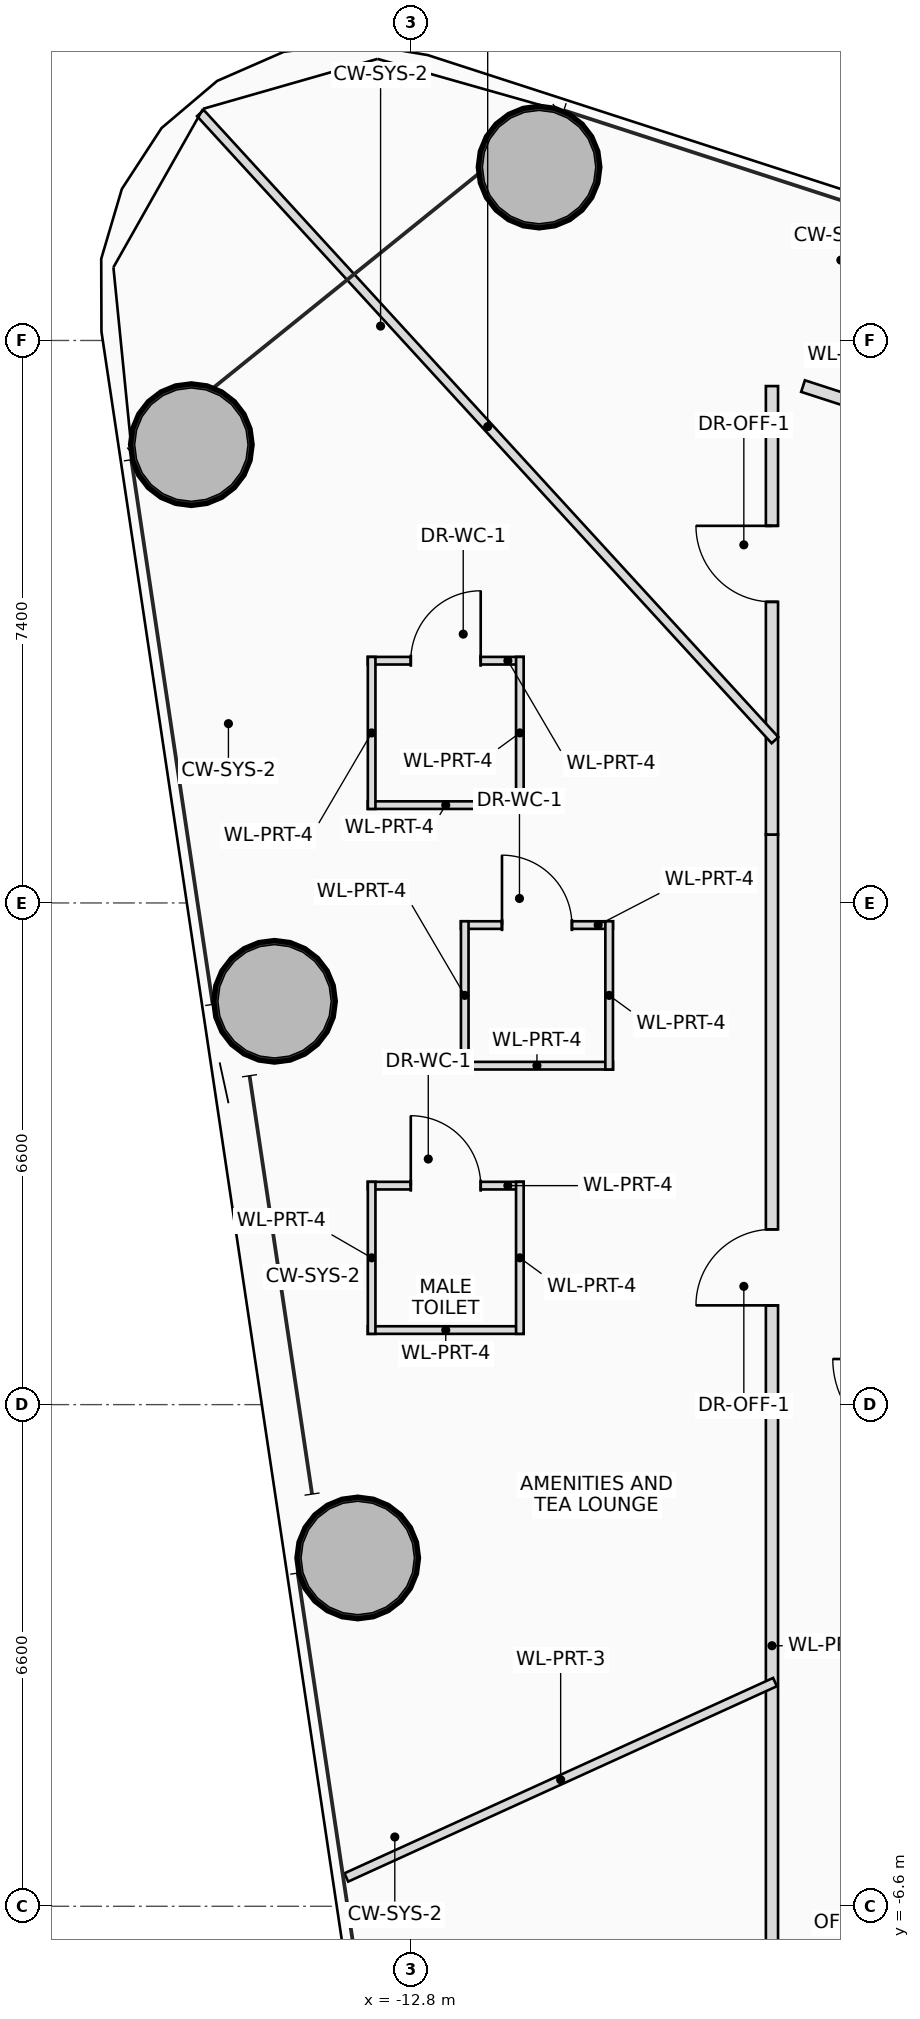
"""IFC4 building model, lengths in metres.
Left out: names, types, materials, properties, quantities, classifications, styles, units other than length and angle.
Written with IfcOpenShell. Run it as: python <this file> out.ifc"""

import sys

from ifc_helpers import new_model, si_unit, direction, frame, frame_2d, origin, origin_2d, place, context, subcontext, project, spatial, rectangle, hollow_circle, extrude, source, transform, mapped, element, fill, save


model = new_model("IFC4")
c1 = context("Model", 3, precision=1e-05, world=origin(), true_north=direction((0.0, 1.0)))
c2 = subcontext(c1, "Body", "Model", "MODEL_VIEW")
j1 = project(units=[si_unit("LENGTHUNIT", "METRE"), si_unit("PLANEANGLEUNIT", "RADIAN")], contexts=[c1])
p1 = place(None, origin())
s1 = spatial("IfcSite", under=j1, at=p1, CompositionType="ELEMENT")
p2 = place(p1, origin())
s2 = spatial("IfcBuilding", under=s1, at=p2, CompositionType="ELEMENT")
p3 = place(p2, frame((0.0, 0.0, 58.55)))
s3 = spatial("IfcBuildingStorey", under=s2, at=p3, CompositionType="ELEMENT", Elevation=58.55)
m1 = source(origin(), c2, "Body", "SweptSolid", [
    extrude(hollow_circle(Radius=0.8, WallThickness=0.055, at=origin_2d()), origin(), (0.0, 0.0, 1.0), 3.75),
])
for number, where, z_axis, x_axis in (
    (1, (-11.114, 16.281, 0.0), (0.0, 0.0, 1.0), (1.0, 0.0, 0.0)),
    (2, (-15.689, 12.629, 0.0), (0.0, 0.0, 1.0), (1.0, 0.0, 0.0)),
    (3, (-14.594, 5.306, 0.0), (0.0, 0.0, 1.0), (1.0, 0.0, 0.0)),
    (4, (-13.5, -2.018, 0.0), (0.0, 0.0, 1.0), (1.0, 0.0, 0.0)),
):
    element("IfcColumn", number, at=place(p3, frame(where, z_axis=z_axis, x_axis=x_axis)), inside=s3, PredefinedType="COLUMN", context=c2, shape_type="MappedRepresentation", body=[
        mapped(m1, transform((0.0, 0.0, 0.0), scale=1.0)),
    ])
p4 = place(p3, frame((-13.367, 2.881, 0.0), z_axis=(0.0, 0.0, 1.0), x_axis=(1.0, 0.0, 0.0)))
e5 = element("IfcWall", 5, at=p4, inside=s3, PredefinedType="PARTITIONING", context=c2, shape_type="SweptSolid", body=[
    extrude(rectangle(XDim=2.05, YDim=0.1, at=frame_2d((1.025, 0.0))), origin(), (0.0, 0.0, 1.0), 3.2),
])
p5 = place(p4, frame((0.565, 0.0, 0.0)))
e6 = element("IfcOpeningElement", 6, at=p5, cuts=e5, PredefinedType="OPENING", context=c2, shape_type="SweptSolid", body=[
    extrude(rectangle(XDim=0.92, YDim=2.1, at=frame_2d((0.46, 1.05))), frame((0.0, 0.06, 0.0), z_axis=(0.0, -1.0, 0.0), x_axis=(1.0, 0.0, 0.0)), (0.0, 0.0, 1.0), 0.12),
])
p6 = place(p3, frame((-11.317, 0.981, 0.0), z_axis=(0.0, 0.0, 1.0), x_axis=(-1.0, 0.0, 0.0)))
e7 = element("IfcWall", 7, at=p6, inside=s3, PredefinedType="PARTITIONING", context=c2, shape_type="SweptSolid", body=[
    extrude(rectangle(XDim=2.05, YDim=0.1, at=frame_2d((1.025, 0.0))), origin(), (0.0, 0.0, 1.0), 3.545),
])
p7 = place(p3, frame((-11.367, 2.931, 0.0), z_axis=(0.0, 0.0, 1.0), x_axis=(0.0, -1.0, 0.0)))
e8 = element("IfcWall", 8, at=p7, inside=s3, PredefinedType="PARTITIONING", context=c2, shape_type="SweptSolid", body=[
    extrude(rectangle(XDim=2.0, YDim=0.1, at=frame_2d((1.0, 0.0))), origin(), (0.0, 0.0, 1.0), 3.2),
])
p8 = place(p3, frame((-13.317, 0.931, 0.0), z_axis=(0.0, 0.0, 1.0), x_axis=(0.0, 1.0, 0.0)))
e9 = element("IfcWall", 9, at=p8, inside=s3, PredefinedType="PARTITIONING", context=c2, shape_type="SweptSolid", body=[
    extrude(rectangle(XDim=2.0, YDim=0.1, at=frame_2d((1.0, 0.0))), origin(), (0.0, 0.0, 1.0), 3.545),
])
p9 = place(p3, frame((-13.367, 9.787, 0.0), z_axis=(0.0, 0.0, 1.0), x_axis=(1.0, 0.0, 0.0)))
e10 = element("IfcWall", 10, at=p9, inside=s3, PredefinedType="PARTITIONING", context=c2, shape_type="SweptSolid", body=[
    extrude(rectangle(XDim=2.05, YDim=0.1, at=frame_2d((1.025, 0.0))), origin(), (0.0, 0.0, 1.0), 2.85),
])
p10 = place(p9, frame((0.565, 0.0, 0.0)))
e11 = element("IfcOpeningElement", 11, at=p10, cuts=e10, PredefinedType="OPENING", context=c2, shape_type="SweptSolid", body=[
    extrude(rectangle(XDim=0.92, YDim=2.1, at=frame_2d((0.46, 1.05))), frame((0.0, 0.06, 0.0), z_axis=(0.0, -1.0, 0.0), x_axis=(1.0, 0.0, 0.0)), (0.0, 0.0, 1.0), 0.12),
])
p11 = place(p3, frame((-11.317, 7.887, 0.0), z_axis=(0.0, 0.0, 1.0), x_axis=(-1.0, 0.0, 0.0)))
e12 = element("IfcWall", 12, at=p11, inside=s3, PredefinedType="PARTITIONING", context=c2, shape_type="SweptSolid", body=[
    extrude(rectangle(XDim=2.05, YDim=0.1, at=frame_2d((1.025, 0.0))), origin(), (0.0, 0.0, 1.0), 3.2),
])
p12 = place(p3, frame((-11.367, 9.837, 0.0), z_axis=(0.0, 0.0, 1.0), x_axis=(0.0, -1.0, 0.0)))
e13 = element("IfcWall", 13, at=p12, inside=s3, PredefinedType="PARTITIONING", context=c2, shape_type="SweptSolid", body=[
    extrude(rectangle(XDim=2.0, YDim=0.1, at=frame_2d((1.0, 0.0))), origin(), (0.0, 0.0, 1.0), 2.85),
])
p13 = place(p3, frame((-13.317, 7.837, 0.0), z_axis=(0.0, 0.0, 1.0), x_axis=(0.0, 1.0, 0.0)))
e14 = element("IfcWall", 14, at=p13, inside=s3, PredefinedType="PARTITIONING", context=c2, shape_type="SweptSolid", body=[
    extrude(rectangle(XDim=2.0, YDim=0.1, at=frame_2d((1.0, 0.0))), origin(), (0.0, 0.0, 1.0), 3.545),
])
p14 = place(p3, frame((-12.142, 6.309, 0.0), z_axis=(0.0, 0.0, 1.0), x_axis=(1.0, 0.0, 0.0)))
e15 = element("IfcWall", 15, at=p14, inside=s3, PredefinedType="PARTITIONING", context=c2, shape_type="SweptSolid", body=[
    extrude(rectangle(XDim=2.0, YDim=0.1, at=frame_2d((1.0, 0.0))), origin(), (0.0, 0.0, 1.0), 3.05),
])
p15 = place(p14, frame((0.54, 0.0, 0.0)))
e16 = element("IfcOpeningElement", 16, at=p15, cuts=e15, PredefinedType="OPENING", context=c2, shape_type="SweptSolid", body=[
    extrude(rectangle(XDim=0.92, YDim=2.1, at=frame_2d((0.46, 1.05))), frame((0.0, 0.06, 0.0), z_axis=(0.0, -1.0, 0.0), x_axis=(1.0, 0.0, 0.0)), (0.0, 0.0, 1.0), 0.12),
])
p16 = place(p3, frame((-10.142, 4.459, 0.0), z_axis=(0.0, 0.0, 1.0), x_axis=(-1.0, 0.0, 0.0)))
e17 = element("IfcWall", 17, at=p16, inside=s3, PredefinedType="PARTITIONING", context=c2, shape_type="SweptSolid", body=[
    extrude(rectangle(XDim=2.0, YDim=0.1, at=frame_2d((1.0, 0.0))), origin(), (0.0, 0.0, 1.0), 3.2),
])
for number, where, z_axis, x_axis in (
    (18, (-10.192, 6.359, 0.0), (0.0, 0.0, 1.0), (0.0, -1.0, 0.0)),
    (19, (-12.092, 4.409, 0.0), (0.0, 0.0, 1.0), (0.0, 1.0, 0.0)),
):
    element("IfcWall", number, at=place(p3, frame(where, z_axis=z_axis, x_axis=x_axis)), inside=s3, PredefinedType="PARTITIONING", context=c2, shape_type="SweptSolid", body=[
        extrude(rectangle(XDim=1.95, YDim=0.1, at=frame_2d((0.975, 0.0))), origin(), (0.0, 0.0, 1.0), 2.85),
    ])
p17 = place(p3, frame((-8.05, -7.5, 0.0), z_axis=(0.0, 0.0, 1.0), x_axis=(0.0, 1.0, 0.0)))
e20 = element("IfcWall", 20, at=p17, inside=s3, PredefinedType="PARTITIONING", context=c2, shape_type="SweptSolid", body=[
    extrude(rectangle(XDim=15.0, YDim=0.16, at=frame_2d((7.5, 0.0))), origin(), (0.0, 0.0, 1.0), 2.85),
])
p18 = place(p17, frame((8.806, 0.0, 0.0)))
e21 = element("IfcOpeningElement", 21, at=p18, cuts=e20, PredefinedType="OPENING", context=c2, shape_type="SweptSolid", body=[
    extrude(rectangle(XDim=1.0, YDim=2.25, at=frame_2d((0.5, 1.125))), frame((0.0, 0.09, 0.0), z_axis=(0.0, -1.0, 0.0), x_axis=(1.0, 0.0, 0.0)), (0.0, 0.0, 1.0), 0.18),
])
p19 = place(p3, frame((-8.05, 7.5, 0.0), z_axis=(0.0, 0.0, 1.0), x_axis=(0.0, 1.0, 0.0)))
e22 = element("IfcWall", 22, at=p19, inside=s3, PredefinedType="PARTITIONING", context=c2, shape_type="SweptSolid", body=[
    extrude(rectangle(XDim=5.9, YDim=0.16, at=frame_2d((2.95, 0.0))), origin(), (0.0, 0.0, 1.0), 2.85),
])
p20 = place(p19, frame((3.061, 0.0, 0.0)))
e23 = element("IfcOpeningElement", 23, at=p20, cuts=e22, PredefinedType="OPENING", context=c2, shape_type="SweptSolid", body=[
    extrude(rectangle(XDim=1.0, YDim=2.25, at=frame_2d((0.5, 1.125))), frame((0.0, 0.09, 0.0), z_axis=(0.0, -1.0, 0.0), x_axis=(1.0, 0.0, 0.0)), (0.0, 0.0, 1.0), 0.18),
])
p21 = place(p3, frame((-7.641, 13.4, 0.0), z_axis=(0.0, 0.0, 1.0), x_axis=(0.951277022007, -0.308337521884, 0.0)))
e24 = element("IfcWall", 24, at=p21, inside=s3, PredefinedType="PARTITIONING", context=c2, shape_type="SweptSolid", body=[
    extrude(rectangle(XDim=1.357, YDim=0.16, at=frame_2d((0.679, 0.0))), origin(), (0.0, 0.0, 1.0), 3.545),
])
p22 = place(p3, frame((-8.01, 8.741, 0.0), z_axis=(0.0, 0.0, 1.0), x_axis=(-0.675595196102, 0.737272765674, 0.0)))
e25 = element("IfcWall", 25, at=p22, inside=s3, PredefinedType="PARTITIONING", context=c2, shape_type="SweptSolid", body=[
    extrude(rectangle(XDim=11.19, YDim=0.12, at=frame_2d((5.595, 0.0))), origin(), (0.0, 0.0, 1.0), 3.01),
])
p23 = place(p3, frame((-8.01, -3.65, 0.0), z_axis=(0.0, 0.0, 1.0), x_axis=(-0.909955974898, -0.414704863425, 0.0)))
e26 = element("IfcWall", 26, at=p23, inside=s3, PredefinedType="PARTITIONING", context=c2, shape_type="SweptSolid", body=[
    extrude(rectangle(XDim=6.198, YDim=0.12, at=frame_2d((3.099, 0.0))), origin(), (0.0, 0.0, 1.0), 2.85),
])
p24 = place(p5, origin())
e27 = element("IfcDoor", 27, at=p24, inside=s3, OperationType="SINGLE_SWING_LEFT", PredefinedType="DOOR", context=c2, shape_type="SweptSolid", body=[
    extrude(rectangle(XDim=0.92, YDim=2.1, at=frame_2d((0.46, 1.05))), frame((0.0, 0.025, 0.0), z_axis=(0.0, -1.0, 0.0), x_axis=(1.0, 0.0, 0.0)), (0.0, 0.0, 1.0), 0.05),
])
fill(e6, e27)
p25 = place(p10, origin())
e28 = element("IfcDoor", 28, at=p25, inside=s3, OperationType="SINGLE_SWING_RIGHT", PredefinedType="DOOR", context=c2, shape_type="SweptSolid", body=[
    extrude(rectangle(XDim=0.92, YDim=2.1, at=frame_2d((0.46, 1.05))), frame((0.0, 0.025, 0.0), z_axis=(0.0, -1.0, 0.0), x_axis=(1.0, 0.0, 0.0)), (0.0, 0.0, 1.0), 0.05),
])
fill(e11, e28)
p26 = place(p15, origin())
e29 = element("IfcDoor", 29, at=p26, inside=s3, OperationType="SINGLE_SWING_LEFT", PredefinedType="DOOR", context=c2, shape_type="SweptSolid", body=[
    extrude(rectangle(XDim=0.92, YDim=2.1, at=frame_2d((0.46, 1.05))), frame((0.0, 0.025, 0.0), z_axis=(0.0, -1.0, 0.0), x_axis=(1.0, 0.0, 0.0)), (0.0, 0.0, 1.0), 0.05),
])
fill(e16, e29)
p27 = place(p18, origin())
e30 = element("IfcDoor", 30, at=p27, inside=s3, OperationType="SINGLE_SWING_LEFT", PredefinedType="DOOR", context=c2, shape_type="SweptSolid", body=[
    extrude(rectangle(XDim=1.0, YDim=2.25, at=frame_2d((0.5, 1.125))), frame((0.0, 0.025, 0.0), z_axis=(0.0, -1.0, 0.0), x_axis=(1.0, 0.0, 0.0)), (0.0, 0.0, 1.0), 0.05),
])
fill(e21, e30)
p28 = place(p20, origin())
e31 = element("IfcDoor", 31, at=p28, inside=s3, OperationType="SINGLE_SWING_RIGHT", PredefinedType="DOOR", context=c2, shape_type="SweptSolid", body=[
    extrude(rectangle(XDim=1.0, YDim=2.25, at=frame_2d((0.5, 1.125))), frame((0.0, 0.025, 0.0), z_axis=(0.0, -1.0, 0.0), x_axis=(1.0, 0.0, 0.0)), (0.0, 0.0, 1.0), 0.05),
])
fill(e23, e31)
save(model, sys.argv[1])
